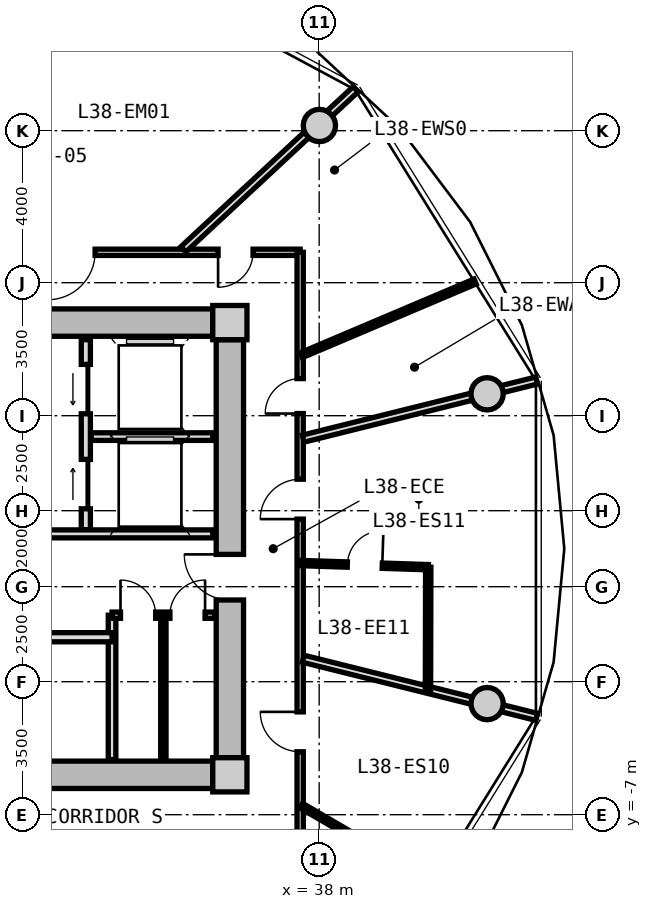
"""IFC4 building model, lengths in metres.
Left out: names, types, materials, properties, quantities, classifications, styles, units other than length and angle.
Written with IfcOpenShell. Run it as: python <this file> out.ifc"""

import sys

from ifc_helpers import new_model, si_unit, direction, frame, frame_2d, origin, origin_2d, place, context, subcontext, project, spatial, rectangle, circle, extrude, source, transform, mapped, element, fill, save


model = new_model("IFC4")
c1 = context("Model", 3, precision=1e-05, world=origin(), true_north=direction((0.0, 1.0)))
c2 = subcontext(c1, "Body", "Model", "MODEL_VIEW")
j1 = project(units=[si_unit("LENGTHUNIT", "METRE"), si_unit("PLANEANGLEUNIT", "RADIAN")], contexts=[c1])
p1 = place(None, origin())
s1 = spatial("IfcSite", under=j1, at=p1, CompositionType="ELEMENT")
p2 = place(p1, origin())
s2 = spatial("IfcBuilding", under=s1, at=p2, CompositionType="ELEMENT")
p3 = place(p2, frame((0.0, 0.0, 123.7)))
s3 = spatial("IfcBuildingStorey", under=s2, at=p3, CompositionType="ELEMENT", Elevation=123.7)
m1 = source(origin(), c2, "Body", "SweptSolid", [
    extrude(rectangle(XDim=0.9, YDim=0.9, at=origin_2d()), origin(), (0.0, 0.0, 1.0), 3.05),
])
for number, where, z_axis, x_axis in (
    (1, (35.65, -5.95, 0.0), (0.0, 0.0, 1.0), (1.0, 0.0, 0.0)),
    (2, (35.65, 5.95, 0.0), (0.0, 0.0, 1.0), (1.0, 0.0, 0.0)),
):
    element("IfcColumn", number, at=place(p3, frame(where, z_axis=z_axis, x_axis=x_axis)), inside=s3, PredefinedType="COLUMN", context=c2, shape_type="MappedRepresentation", body=[
        mapped(m1, transform((0.0, 0.0, 0.0), x_axis=(1.0, 0.0, 0.0), y_axis=(0.0, 1.0, 0.0), z_axis=(0.0, 0.0, 1.0), scale=1.0)),
    ])
m2 = source(origin(), c2, "Body", "SweptSolid", [
    extrude(rectangle(XDim=14.4, YDim=0.72, at=frame_2d((7.2, 0.0))), origin(), (0.0, 0.0, 1.0), 2.79),
])
for number, where, z_axis, x_axis in (
    (3, (20.8, 5.95, 0.0), (0.0, 0.0, 1.0), (1.0, 0.0, 0.0)),
    (4, (35.2, -5.95, 0.0), (0.0, 0.0, 1.0), (-1.0, 0.0, 0.0)),
):
    element("IfcWall", number, at=place(p3, frame(where, z_axis=z_axis, x_axis=x_axis)), inside=s3, PredefinedType="SHEAR", context=c2, shape_type="MappedRepresentation", body=[
        mapped(m2, transform((0.0, 0.0, 0.0), x_axis=(1.0, 0.0, 0.0), y_axis=(0.0, 1.0, 0.0), z_axis=(0.0, 0.0, 1.0), scale=1.0)),
    ])
m3 = source(origin(), c2, "Body", "SweptSolid", [
    extrude(rectangle(XDim=11.0, YDim=0.72, at=frame_2d((5.5, 0.0))), origin(), (0.0, 0.0, 1.0), 2.79),
])
p4 = place(p3, frame((35.65, 5.5, 0.0), z_axis=(0.0, 0.0, 1.0), x_axis=(0.0, -1.0, 0.0)))
e5 = element("IfcWall", 5, at=p4, inside=s3, PredefinedType="SHEAR", context=c2, shape_type="MappedRepresentation", body=[
    mapped(m3, transform((0.0, 0.0, 0.0), x_axis=(1.0, 0.0, 0.0), y_axis=(0.0, 1.0, 0.0), z_axis=(0.0, 0.0, 1.0), scale=1.0)),
])
p5 = place(p4, frame((5.65, 0.0, 0.0)))
e6 = element("IfcOpeningElement", 6, at=p5, cuts=e5, PredefinedType="OPENING", context=c2, shape_type="SweptSolid", body=[
    extrude(rectangle(XDim=1.2, YDim=2.15, at=frame_2d((0.6, 1.075))), frame((0.0, 0.37, 0.0), z_axis=(0.0, -1.0, 0.0), x_axis=(1.0, 0.0, 0.0)), (0.0, 0.0, 1.0), 0.74),
])
m4 = source(origin(), c2, "Body", "SweptSolid", [
    extrude(circle(Radius=0.425, at=origin_2d()), origin(), (0.0, 0.0, 1.0), 3.05),
])
for number, where, z_axis, x_axis in (
    (7, (42.419, 4.076, 0.0), (0.0, 0.0, 1.0), (1.0, 0.0, 0.0)),
    (8, (38.006, 11.137, 0.0), (0.0, 0.0, 1.0), (1.0, 0.0, 0.0)),
    (9, (42.419, -4.076, 0.0), (0.0, 0.0, 1.0), (1.0, 0.0, 0.0)),
):
    element("IfcColumn", number, at=place(p3, frame(where, z_axis=z_axis, x_axis=x_axis)), inside=s3, PredefinedType="COLUMN", context=c2, shape_type="MappedRepresentation", body=[
        mapped(m4, transform((0.0, 0.0, 0.0), x_axis=(1.0, 0.0, 0.0), y_axis=(0.0, 1.0, 0.0), z_axis=(0.0, 0.0, 1.0), scale=1.0)),
    ])
m5 = source(origin(), c2, "Body", "SweptSolid", [
    extrude(rectangle(XDim=5.0, YDim=0.24, at=frame_2d((2.5, 0.0))), origin(), (0.0, 0.0, 1.0), 2.775),
])
p6 = place(p3, frame((31.86, 0.5, 0.0), z_axis=(0.0, 0.0, 1.0), x_axis=(0.0, 1.0, 0.0)))
e10 = element("IfcWall", 10, at=p6, inside=s3, PredefinedType="PARTITIONING", context=c2, shape_type="MappedRepresentation", body=[
    mapped(m5, transform((0.0, 0.0, 0.0), x_axis=(1.0, 0.0, 0.0), y_axis=(0.0, 1.0, 0.0), z_axis=(0.0, 0.0, 1.0), scale=1.0)),
])
p7 = place(p6, frame((3.05, 0.0, 0.0)))
e11 = element("IfcOpeningElement", 11, at=p7, cuts=e10, PredefinedType="OPENING", context=c2, shape_type="SweptSolid", body=[
    extrude(rectangle(XDim=1.3, YDim=2.2, at=frame_2d((0.65, 1.1))), frame((0.0, 0.13, 0.0), z_axis=(0.0, -1.0, 0.0), x_axis=(1.0, 0.0, 0.0)), (0.0, 0.0, 1.0), 0.26),
])
p8 = place(p6, frame((0.55, 0.0, 0.0)))
e12 = element("IfcOpeningElement", 12, at=p8, cuts=e10, PredefinedType="OPENING", context=c2, shape_type="SweptSolid", body=[
    extrude(rectangle(XDim=1.3, YDim=2.2, at=frame_2d((0.65, 1.1))), frame((0.0, 0.13, 0.0), z_axis=(0.0, -1.0, 0.0), x_axis=(1.0, 0.0, 0.0)), (0.0, 0.0, 1.0), 0.26),
])
m6 = source(origin(), c2, "Body", "SweptSolid", [
    extrude(rectangle(XDim=3.2, YDim=0.2, at=frame_2d((1.6, 0.0))), origin(), (0.0, 0.0, 1.0), 2.775),
])
p9 = place(p3, frame((32.0, 2.95, 0.0), z_axis=(0.0, 0.0, 1.0), x_axis=(1.0, 0.0, 0.0)))
e13 = element("IfcWall", 13, at=p9, inside=s3, PredefinedType="PARTITIONING", context=c2, shape_type="MappedRepresentation", body=[
    mapped(m6, transform((0.0, 0.0, 0.0), x_axis=(1.0, 0.0, 0.0), y_axis=(0.0, 1.0, 0.0), z_axis=(0.0, 0.0, 1.0), scale=1.0)),
])
m7 = source(origin(), c2, "Body", "SweptSolid", [
    extrude(rectangle(XDim=6.66, YDim=0.21, at=frame_2d((3.33, 0.0))), origin(), (0.0, 0.0, 1.0), 2.775),
])
p10 = place(p3, frame((28.54, 0.39, 0.0), z_axis=(0.0, 0.0, 1.0), x_axis=(1.0, 0.0, 0.0)))
e14 = element("IfcWall", 14, at=p10, inside=s3, PredefinedType="PARTITIONING", context=c2, shape_type="MappedRepresentation", body=[
    mapped(m7, transform((0.0, 0.0, 0.0), x_axis=(1.0, 0.0, 0.0), y_axis=(0.0, 1.0, 0.0), z_axis=(0.0, 0.0, 1.0), scale=1.0)),
])
p11 = place(p10, frame((1.0, 0.0, 0.0)))
e15 = element("IfcOpeningElement", 15, at=p11, cuts=e14, PredefinedType="OPENING", context=c2, shape_type="SweptSolid", body=[
    extrude(rectangle(XDim=1.2, YDim=2.15, at=frame_2d((0.6, 1.075))), frame((0.0, 0.115, 0.0), z_axis=(0.0, -1.0, 0.0), x_axis=(1.0, 0.0, 0.0)), (0.0, 0.0, 1.0), 0.23),
])
m8 = source(origin(), c2, "Body", "SweptSolid", [
    extrude(rectangle(XDim=3.8, YDim=0.2, at=frame_2d((1.9, 0.0))), origin(), (0.0, 0.0, 1.0), 2.775),
])
p12 = place(p3, frame((32.55, -5.55, 0.0), z_axis=(0.0, 0.0, 1.0), x_axis=(0.0, 1.0, 0.0)))
e16 = element("IfcWall", 16, at=p12, inside=s3, PredefinedType="PARTITIONING", context=c2, shape_type="MappedRepresentation", body=[
    mapped(m8, transform((0.0, 0.0, 0.0), x_axis=(1.0, 0.0, 0.0), y_axis=(0.0, 1.0, 0.0), z_axis=(0.0, 0.0, 1.0), scale=1.0)),
])
m9 = source(origin(), c2, "Body", "SweptSolid", [
    extrude(rectangle(XDim=4.13, YDim=0.24, at=frame_2d((2.065, 0.0))), origin(), (0.0, 0.0, 1.0), 2.775),
])
p13 = place(p3, frame((28.42, -2.33, 0.0), z_axis=(0.0, 0.0, 1.0), x_axis=(1.0, 0.0, 0.0)))
e17 = element("IfcWall", 17, at=p13, inside=s3, PredefinedType="PARTITIONING", context=c2, shape_type="MappedRepresentation", body=[
    mapped(m9, transform((0.0, 0.0, 0.0), x_axis=(1.0, 0.0, 0.0), y_axis=(0.0, 1.0, 0.0), z_axis=(0.0, 0.0, 1.0), scale=1.0)),
])
p14 = place(p13, frame((0.5, 0.0, 0.0)))
e18 = element("IfcOpeningElement", 18, at=p14, cuts=e17, PredefinedType="OPENING", context=c2, shape_type="SweptSolid", body=[
    extrude(rectangle(XDim=1.1, YDim=2.2, at=frame_2d((0.55, 1.1))), frame((0.0, 0.13, 0.0), z_axis=(0.0, -1.0, 0.0), x_axis=(1.0, 0.0, 0.0)), (0.0, 0.0, 1.0), 0.26),
])
m10 = source(origin(), c2, "Body", "SweptSolid", [
    extrude(rectangle(XDim=2.7, YDim=0.165, at=frame_2d((1.35, 0.0))), origin(), (0.0, 0.0, 1.0), 2.775),
])
p15 = place(p3, frame((32.55, -1.75, 0.0), z_axis=(0.0, 0.0, 1.0), x_axis=(1.0, 0.0, 0.0)))
e19 = element("IfcWall", 19, at=p15, inside=s3, PredefinedType="PARTITIONING", context=c2, shape_type="MappedRepresentation", body=[
    mapped(m10, transform((0.0, 0.0, 0.0), x_axis=(1.0, 0.0, 0.0), y_axis=(0.0, 1.0, 0.0), z_axis=(0.0, 0.0, 1.0), scale=1.0)),
])
p16 = place(p15, frame((0.222, 0.0, 0.0)))
e20 = element("IfcOpeningElement", 20, at=p16, cuts=e19, PredefinedType="OPENING", context=c2, shape_type="SweptSolid", body=[
    extrude(rectangle(XDim=0.925, YDim=2.1, at=frame_2d((0.462, 1.05))), frame((0.0, 0.093, 0.0), z_axis=(0.0, -1.0, 0.0), x_axis=(1.0, 0.0, 0.0)), (0.0, 0.0, 1.0), 0.185),
])
p17 = place(p15, frame((1.522, 0.0, 0.0)))
e21 = element("IfcOpeningElement", 21, at=p17, cuts=e19, PredefinedType="OPENING", context=c2, shape_type="SweptSolid", body=[
    extrude(rectangle(XDim=0.925, YDim=2.1, at=frame_2d((0.462, 1.05))), frame((0.0, 0.093, 0.0), z_axis=(0.0, -1.0, 0.0), x_axis=(1.0, 0.0, 0.0)), (0.0, 0.0, 1.0), 0.185),
])
m11 = source(origin(), c2, "Body", "SweptSolid", [
    extrude(rectangle(XDim=3.8, YDim=0.14, at=frame_2d((1.9, 0.0))), origin(), (0.0, 0.0, 1.0), 2.775),
])
p18 = place(p3, frame((33.9, -5.55, 0.0), z_axis=(0.0, 0.0, 1.0), x_axis=(0.0, 1.0, 0.0)))
e22 = element("IfcWall", 22, at=p18, inside=s3, PredefinedType="PARTITIONING", context=c2, shape_type="MappedRepresentation", body=[
    mapped(m11, transform((0.0, 0.0, 0.0), x_axis=(1.0, 0.0, 0.0), y_axis=(0.0, 1.0, 0.0), z_axis=(0.0, 0.0, 1.0), scale=1.0)),
])
m12 = source(origin(), c2, "Body", "SweptSolid", [
    extrude(rectangle(XDim=9.234, YDim=0.165, at=frame_2d((4.617, 0.0))), origin(), (0.0, 0.0, 1.0), 2.775),
])
p19 = place(p3, frame((28.266, 7.8, 0.0), z_axis=(0.0, 0.0, 1.0), x_axis=(1.0, 0.0, 0.0)))
e23 = element("IfcWall", 23, at=p19, inside=s3, PredefinedType="PARTITIONING", context=c2, shape_type="MappedRepresentation", body=[
    mapped(m12, transform((0.0, 0.0, 0.0), x_axis=(1.0, 0.0, 0.0), y_axis=(0.0, 1.0, 0.0), z_axis=(0.0, 0.0, 1.0), scale=1.0)),
])
p20 = place(p19, frame((7.074, 0.0, 0.0)))
e24 = element("IfcOpeningElement", 24, at=p20, cuts=e23, PredefinedType="OPENING", context=c2, shape_type="SweptSolid", body=[
    extrude(rectangle(XDim=0.92, YDim=2.1, at=frame_2d((0.46, 1.05))), frame((0.0, 0.093, 0.0), z_axis=(0.0, -1.0, 0.0), x_axis=(1.0, 0.0, 0.0)), (0.0, 0.0, 1.0), 0.185),
])
p21 = place(p19, frame((2.588, 0.0, 0.0)))
e25 = element("IfcOpeningElement", 25, at=p21, cuts=e23, PredefinedType="OPENING", context=c2, shape_type="SweptSolid", body=[
    extrude(rectangle(XDim=1.25, YDim=2.2, at=frame_2d((0.625, 1.1))), frame((0.0, 0.093, 0.0), z_axis=(0.0, -1.0, 0.0), x_axis=(1.0, 0.0, 0.0)), (0.0, 0.0, 1.0), 0.185),
])
m13 = source(origin(), c2, "Body", "SweptSolid", [
    extrude(rectangle(XDim=15.6, YDim=0.165, at=frame_2d((7.8, 0.0))), origin(), (0.0, 0.0, 1.0), 2.775),
])
p22 = place(p3, frame((37.5, 7.8, 0.0), z_axis=(0.0, 0.0, 1.0), x_axis=(0.0, -1.0, 0.0)))
e26 = element("IfcWall", 26, at=p22, inside=s3, PredefinedType="PARTITIONING", context=c2, shape_type="MappedRepresentation", body=[
    mapped(m13, transform((0.0, 0.0, 0.0), x_axis=(1.0, 0.0, 0.0), y_axis=(0.0, 1.0, 0.0), z_axis=(0.0, 0.0, 1.0), scale=1.0)),
])
p23 = place(p22, frame((12.094, 0.0, 0.0)))
e27 = element("IfcOpeningElement", 27, at=p23, cuts=e26, PredefinedType="OPENING", context=c2, shape_type="SweptSolid", body=[
    extrude(rectangle(XDim=1.05, YDim=2.15, at=frame_2d((0.525, 1.075))), frame((0.0, 0.093, 0.0), z_axis=(0.0, -1.0, 0.0), x_axis=(1.0, 0.0, 0.0)), (0.0, 0.0, 1.0), 0.185),
])
p24 = place(p22, frame((5.971, 0.0, 0.0)))
e28 = element("IfcOpeningElement", 28, at=p24, cuts=e26, PredefinedType="OPENING", context=c2, shape_type="SweptSolid", body=[
    extrude(rectangle(XDim=1.05, YDim=2.15, at=frame_2d((0.525, 1.075))), frame((0.0, 0.093, 0.0), z_axis=(0.0, -1.0, 0.0), x_axis=(1.0, 0.0, 0.0)), (0.0, 0.0, 1.0), 0.185),
])
p25 = place(p22, frame((3.324, 0.0, 0.0)))
e29 = element("IfcOpeningElement", 29, at=p25, cuts=e26, PredefinedType="OPENING", context=c2, shape_type="SweptSolid", body=[
    extrude(rectangle(XDim=0.92, YDim=2.1, at=frame_2d((0.46, 1.05))), frame((0.0, 0.093, 0.0), z_axis=(0.0, -1.0, 0.0), x_axis=(1.0, 0.0, 0.0)), (0.0, 0.0, 1.0), 0.185),
])
m14 = source(origin(), c2, "Body", "SweptSolid", [
    extrude(rectangle(XDim=6.331, YDim=0.19, at=frame_2d((3.165, 0.0))), origin(), (0.0, 0.0, 1.0), 2.275),
])
p26 = place(p3, frame((37.58, -2.896, 0.0), z_axis=(0.0, 0.0, 1.0), x_axis=(0.97036440661, -0.241646267062, 0.0)))
e30 = element("IfcWall", 30, at=p26, inside=s3, PredefinedType="PARTITIONING", context=c2, shape_type="MappedRepresentation", body=[
    mapped(m14, transform((0.0, 0.0, 0.0), x_axis=(1.0, 0.0, 0.0), y_axis=(0.0, 1.0, 0.0), z_axis=(0.0, 0.0, 1.0), scale=1.0)),
])
m15 = source(origin(), c2, "Body", "SweptSolid", [
    extrude(rectangle(XDim=2.172, YDim=0.14, at=frame_2d((1.086, 0.0))), origin(), (0.0, 0.0, 1.0), 2.775),
])
p27 = place(p3, frame((37.53, -6.762, 0.0), z_axis=(0.0, 0.0, 1.0), x_axis=(0.863562702562, -0.504241468688, 0.0)))
e31 = element("IfcWall", 31, at=p27, inside=s3, PredefinedType="PARTITIONING", context=c2, shape_type="MappedRepresentation", body=[
    mapped(m15, transform((0.0, 0.0, 0.0), x_axis=(1.0, 0.0, 0.0), y_axis=(0.0, 1.0, 0.0), z_axis=(0.0, 0.0, 1.0), scale=1.0)),
])
p28 = place(p3, frame((37.58, 2.896, 0.0), z_axis=(0.0, 0.0, 1.0), x_axis=(0.97036440661, 0.241646267062, 0.0)))
e32 = element("IfcWall", 32, at=p28, inside=s3, PredefinedType="PARTITIONING", context=c2, shape_type="MappedRepresentation", body=[
    mapped(m14, transform((0.0, 0.0, 0.0), x_axis=(1.0, 0.0, 0.0), y_axis=(0.0, 1.0, 0.0), z_axis=(0.0, 0.0, 1.0), scale=1.0)),
])
m16 = source(origin(), c2, "Body", "SweptSolid", [
    extrude(rectangle(XDim=3.342, YDim=0.14, at=frame_2d((1.671, 0.0))), origin(), (0.0, 0.0, 1.0), 2.775),
])
p29 = place(p3, frame((37.53, -0.378, 0.0), z_axis=(0.0, 0.0, 1.0), x_axis=(0.999468967034, -0.032585026264, 0.0)))
e33 = element("IfcWall", 33, at=p29, inside=s3, PredefinedType="PARTITIONING", context=c2, shape_type="MappedRepresentation", body=[
    mapped(m16, transform((0.0, 0.0, 0.0), x_axis=(1.0, 0.0, 0.0), y_axis=(0.0, 1.0, 0.0), z_axis=(0.0, 0.0, 1.0), scale=1.0)),
])
p30 = place(p29, frame((1.211, 0.0, 0.0)))
e34 = element("IfcOpeningElement", 34, at=p30, cuts=e33, PredefinedType="OPENING", context=c2, shape_type="SweptSolid", body=[
    extrude(rectangle(XDim=0.92, YDim=2.1, at=frame_2d((0.46, 1.05))), frame((0.0, 0.08, 0.0), z_axis=(0.0, -1.0, 0.0), x_axis=(1.0, 0.0, 0.0)), (0.0, 0.0, 1.0), 0.16),
])
m17 = source(origin(), c2, "Body", "SweptSolid", [
    extrude(rectangle(XDim=3.247, YDim=0.14, at=frame_2d((1.624, 0.0))), origin(), (0.0, 0.0, 1.0), 2.775),
])
p31 = place(p3, frame((40.87, -0.487, 0.0), z_axis=(0.0, 0.0, 1.0), x_axis=(-0.002105100215, -0.999997784274, 0.0)))
e35 = element("IfcWall", 35, at=p31, inside=s3, PredefinedType="PARTITIONING", context=c2, shape_type="MappedRepresentation", body=[
    mapped(m17, transform((0.0, 0.0, 0.0), x_axis=(1.0, 0.0, 0.0), y_axis=(0.0, 1.0, 0.0), z_axis=(0.0, 0.0, 1.0), scale=1.0)),
])
m18 = source(origin(), c2, "Body", "SweptSolid", [
    extrude(rectangle(XDim=6.187, YDim=0.19, at=frame_2d((3.093, 0.0))), origin(), (0.0, 0.0, 1.0), 2.275),
])
p32 = place(p3, frame((34.429, 7.88, 0.0), z_axis=(0.0, 0.0, 1.0), x_axis=(0.732501077882, 0.680765870841, 0.0)))
e36 = element("IfcWall", 36, at=p32, inside=s3, PredefinedType="PARTITIONING", context=c2, shape_type="MappedRepresentation", body=[
    mapped(m18, transform((0.0, 0.0, 0.0), x_axis=(1.0, 0.0, 0.0), y_axis=(0.0, 1.0, 0.0), z_axis=(0.0, 0.0, 1.0), scale=1.0)),
])
m19 = source(origin(), c2, "Body", "SweptSolid", [
    extrude(rectangle(XDim=4.968, YDim=0.14, at=frame_2d((2.484, 0.0))), origin(), (0.0, 0.0, 1.0), 2.775),
])
p33 = place(p3, frame((37.53, 5.092, 0.0), z_axis=(0.0, 0.0, 1.0), x_axis=(0.920595165864, 0.39051829738, 0.0)))
e37 = element("IfcWall", 37, at=p33, inside=s3, PredefinedType="PARTITIONING", context=c2, shape_type="MappedRepresentation", body=[
    mapped(m19, transform((0.0, 0.0, 0.0), x_axis=(1.0, 0.0, 0.0), y_axis=(0.0, 1.0, 0.0), z_axis=(0.0, 0.0, 1.0), scale=1.0)),
])
m20 = source(origin(), c2, "Body", "SweptSolid", [
    extrude(rectangle(XDim=1.3, YDim=2.2, at=frame_2d((0.65, 1.1))), frame((0.0, 0.025, 0.0), z_axis=(0.0, -1.0, 0.0), x_axis=(1.0, 0.0, 0.0)), (0.0, 0.0, 1.0), 0.05),
])
p34 = place(p7, origin())
e38 = element("IfcDoor", 38, at=p34, inside=s3, OperationType="SLIDING_TO_LEFT", PredefinedType="DOOR", context=c2, shape_type="MappedRepresentation", body=[
    mapped(m20, transform((0.0, 0.0, 0.0), x_axis=(1.0, 0.0, 0.0), y_axis=(0.0, 1.0, 0.0), z_axis=(0.0, 0.0, 1.0), scale=1.0)),
])
fill(e11, e38)
p35 = place(p8, origin())
e39 = element("IfcDoor", 39, at=p35, inside=s3, OperationType="SLIDING_TO_RIGHT", PredefinedType="DOOR", context=c2, shape_type="MappedRepresentation", body=[
    mapped(m20, transform((0.0, 0.0, 0.0), x_axis=(1.0, 0.0, 0.0), y_axis=(0.0, 1.0, 0.0), z_axis=(0.0, 0.0, 1.0), scale=1.0)),
])
fill(e12, e39)
m21 = source(origin(), c2, "Body", "SweptSolid", [
    extrude(rectangle(XDim=1.2, YDim=2.15, at=frame_2d((0.6, 1.075))), frame((0.0, 0.025, 0.0), z_axis=(0.0, -1.0, 0.0), x_axis=(1.0, 0.0, 0.0)), (0.0, 0.0, 1.0), 0.05),
])
p36 = place(p5, frame((1.2, 0.0, 0.0), z_axis=(0.0, 0.0, 1.0), x_axis=(-1.0, 0.0, 0.0)))
e40 = element("IfcDoor", 40, at=p36, inside=s3, OperationType="SINGLE_SWING_RIGHT", PredefinedType="DOOR", context=c2, shape_type="MappedRepresentation", body=[
    mapped(m21, transform((0.0, 0.0, 0.0), x_axis=(1.0, 0.0, 0.0), y_axis=(0.0, 1.0, 0.0), z_axis=(0.0, 0.0, 1.0), scale=1.0)),
])
fill(e6, e40)
m22 = source(origin(), c2, "Body", "SweptSolid", [
    extrude(rectangle(XDim=0.925, YDim=2.1, at=frame_2d((0.462, 1.05))), frame((0.0, 0.025, 0.0), z_axis=(0.0, -1.0, 0.0), x_axis=(1.0, 0.0, 0.0)), (0.0, 0.0, 1.0), 0.05),
])
p37 = place(p16, origin())
e41 = element("IfcDoor", 41, at=p37, inside=s3, OperationType="SINGLE_SWING_LEFT", PredefinedType="DOOR", context=c2, shape_type="MappedRepresentation", body=[
    mapped(m22, transform((0.0, 0.0, 0.0), x_axis=(1.0, 0.0, 0.0), y_axis=(0.0, 1.0, 0.0), z_axis=(0.0, 0.0, 1.0), scale=1.0)),
])
fill(e20, e41)
p38 = place(p17, origin())
e42 = element("IfcDoor", 42, at=p38, inside=s3, OperationType="SINGLE_SWING_RIGHT", PredefinedType="DOOR", context=c2, shape_type="MappedRepresentation", body=[
    mapped(m22, transform((0.0, 0.0, 0.0), x_axis=(1.0, 0.0, 0.0), y_axis=(0.0, 1.0, 0.0), z_axis=(0.0, 0.0, 1.0), scale=1.0)),
])
fill(e21, e42)
m23 = source(origin(), c2, "Body", "SweptSolid", [
    extrude(rectangle(XDim=1.05, YDim=2.15, at=frame_2d((0.525, 1.075))), frame((0.0, 0.025, 0.0), z_axis=(0.0, -1.0, 0.0), x_axis=(1.0, 0.0, 0.0)), (0.0, 0.0, 1.0), 0.05),
])
p39 = place(p23, frame((1.05, 0.0, 0.0), z_axis=(0.0, 0.0, 1.0), x_axis=(-1.0, 0.0, 0.0)))
e43 = element("IfcDoor", 43, at=p39, inside=s3, OperationType="SINGLE_SWING_RIGHT", PredefinedType="DOOR", context=c2, shape_type="MappedRepresentation", body=[
    mapped(m23, transform((0.0, 0.0, 0.0), x_axis=(1.0, 0.0, 0.0), y_axis=(0.0, 1.0, 0.0), z_axis=(0.0, 0.0, 1.0), scale=1.0)),
])
fill(e27, e43)
p40 = place(p24, frame((1.05, 0.0, 0.0), z_axis=(0.0, 0.0, 1.0), x_axis=(-1.0, 0.0, 0.0)))
e44 = element("IfcDoor", 44, at=p40, inside=s3, OperationType="SINGLE_SWING_LEFT", PredefinedType="DOOR", context=c2, shape_type="MappedRepresentation", body=[
    mapped(m23, transform((0.0, 0.0, 0.0), x_axis=(1.0, 0.0, 0.0), y_axis=(0.0, 1.0, 0.0), z_axis=(0.0, 0.0, 1.0), scale=1.0)),
])
fill(e28, e44)
m24 = source(origin(), c2, "Body", "SweptSolid", [
    extrude(rectangle(XDim=0.92, YDim=2.1, at=frame_2d((0.46, 1.05))), frame((0.0, 0.025, 0.0), z_axis=(0.0, -1.0, 0.0), x_axis=(1.0, 0.0, 0.0)), (0.0, 0.0, 1.0), 0.05),
])
p41 = place(p30, origin())
e45 = element("IfcDoor", 45, at=p41, inside=s3, OperationType="SINGLE_SWING_RIGHT", PredefinedType="DOOR", context=c2, shape_type="MappedRepresentation", body=[
    mapped(m24, transform((0.0, 0.0, 0.0), x_axis=(1.0, 0.0, 0.0), y_axis=(0.0, 1.0, 0.0), z_axis=(0.0, 0.0, 1.0), scale=1.0)),
])
fill(e34, e45)
p42 = place(p25, frame((0.92, 0.0, 0.0), z_axis=(0.0, 0.0, 1.0), x_axis=(-1.0, 0.0, 0.0)))
e46 = element("IfcDoor", 46, at=p42, inside=s3, OperationType="SINGLE_SWING_LEFT", PredefinedType="DOOR", context=c2, shape_type="MappedRepresentation", body=[
    mapped(m24, transform((0.0, 0.0, 0.0), x_axis=(1.0, 0.0, 0.0), y_axis=(0.0, 1.0, 0.0), z_axis=(0.0, 0.0, 1.0), scale=1.0)),
])
fill(e29, e46)
p43 = place(p20, frame((0.92, 0.0, 0.0), z_axis=(0.0, 0.0, 1.0), x_axis=(-1.0, 0.0, 0.0)))
e47 = element("IfcDoor", 47, at=p43, inside=s3, OperationType="SINGLE_SWING_RIGHT", PredefinedType="DOOR", context=c2, shape_type="MappedRepresentation", body=[
    mapped(m24, transform((0.0, 0.0, 0.0), x_axis=(1.0, 0.0, 0.0), y_axis=(0.0, 1.0, 0.0), z_axis=(0.0, 0.0, 1.0), scale=1.0)),
])
fill(e24, e47)
m25 = source(origin(), c2, "Body", "SweptSolid", [
    extrude(rectangle(XDim=1.25, YDim=2.2, at=frame_2d((0.625, 1.1))), frame((0.0, 0.025, 0.0), z_axis=(0.0, -1.0, 0.0), x_axis=(1.0, 0.0, 0.0)), (0.0, 0.0, 1.0), 0.05),
])
p44 = place(p21, frame((1.25, 0.0, 0.0), z_axis=(0.0, 0.0, 1.0), x_axis=(-1.0, 0.0, 0.0)))
e48 = element("IfcDoor", 48, at=p44, inside=s3, OperationType="SINGLE_SWING_RIGHT", PredefinedType="DOOR", context=c2, shape_type="MappedRepresentation", body=[
    mapped(m25, transform((0.0, 0.0, 0.0), x_axis=(1.0, 0.0, 0.0), y_axis=(0.0, 1.0, 0.0), z_axis=(0.0, 0.0, 1.0), scale=1.0)),
])
fill(e25, e48)
save(model, sys.argv[1])
